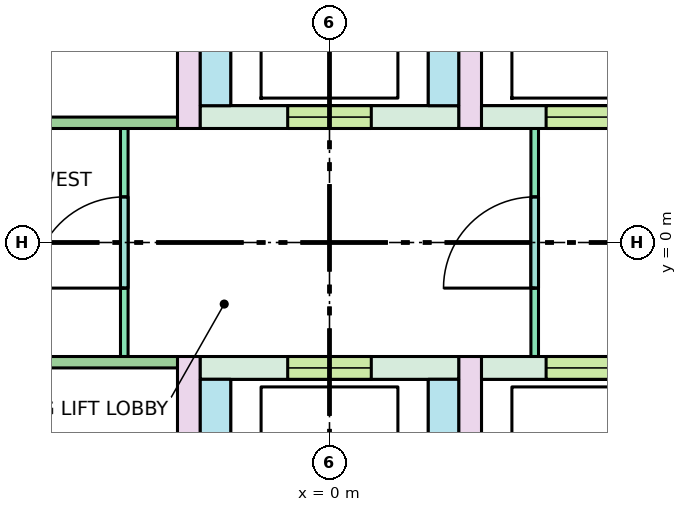
"""IFC4 building model, lengths in metres.
Left out: names, types, materials, properties, quantities, classifications, styles, units other than length and angle.
Written with IfcOpenShell. Run it as: python <this file> out.ifc"""

import sys

from ifc_helpers import new_model, si_unit, direction, frame, frame_2d, origin, place, context, subcontext, project, spatial, rectangle, extrude, element, fill, save


model = new_model("IFC4")
c1 = context("Model", 3, precision=1e-05, world=origin(), true_north=direction((0.0, 1.0)))
c2 = subcontext(c1, "Body", "Model", "MODEL_VIEW")
j1 = project(units=[si_unit("LENGTHUNIT", "METRE"), si_unit("PLANEANGLEUNIT", "RADIAN")], contexts=[c1])
p1 = place(None, origin())
s1 = spatial("IfcSite", under=j1, at=p1, CompositionType="ELEMENT")
p2 = place(p1, origin())
s2 = spatial("IfcBuilding", under=s1, at=p2, CompositionType="ELEMENT")
p3 = place(p2, frame((0.0, 0.0, 253.8)))
s3 = spatial("IfcBuildingStorey", under=s2, at=p3, CompositionType="ELEMENT", Elevation=253.8)
p4 = place(p3, frame((2.0, 1.65, 0.0), z_axis=(0.0, 0.0, 1.0), x_axis=(1.0, 0.0, 0.0)))
e1 = element("IfcWall", 1, at=p4, inside=s3, PredefinedType="SOLIDWALL", context=c2, shape_type="SweptSolid", body=[
    extrude(rectangle(XDim=8.1, YDim=0.3, at=frame_2d((4.05, 0.0))), origin(), (0.0, 0.0, 1.0), 3.42),
])
p5 = place(p4, frame((0.85, 0.0, 0.0)))
e2 = element("IfcOpeningElement", 2, at=p5, cuts=e1, PredefinedType="OPENING", context=c2, shape_type="SweptSolid", body=[
    extrude(rectangle(XDim=1.1, YDim=2.1, at=frame_2d((0.55, 1.05))), frame((0.0, 0.16, 0.0), z_axis=(0.0, -1.0, 0.0), x_axis=(1.0, 0.0, 0.0)), (0.0, 0.0, 1.0), 0.32),
])
p6 = place(p4, frame((3.5, 0.0, 0.0)))
e3 = element("IfcOpeningElement", 3, at=p6, cuts=e1, PredefinedType="OPENING", context=c2, shape_type="SweptSolid", body=[
    extrude(rectangle(XDim=1.1, YDim=2.1, at=frame_2d((0.55, 1.05))), frame((0.0, 0.16, 0.0), z_axis=(0.0, -1.0, 0.0), x_axis=(1.0, 0.0, 0.0)), (0.0, 0.0, 1.0), 0.32),
])
p7 = place(p4, frame((6.3, 0.0, 0.0)))
e4 = element("IfcOpeningElement", 4, at=p7, cuts=e1, PredefinedType="OPENING", context=c2, shape_type="SweptSolid", body=[
    extrude(rectangle(XDim=1.1, YDim=2.1, at=frame_2d((0.55, 1.05))), frame((0.0, 0.16, 0.0), z_axis=(0.0, -1.0, 0.0), x_axis=(1.0, 0.0, 0.0)), (0.0, 0.0, 1.0), 0.32),
])
p8 = place(p3, frame((2.0, -1.65, 0.0), z_axis=(0.0, 0.0, 1.0), x_axis=(1.0, 0.0, 0.0)))
e5 = element("IfcWall", 5, at=p8, inside=s3, PredefinedType="SOLIDWALL", context=c2, shape_type="SweptSolid", body=[
    extrude(rectangle(XDim=8.1, YDim=0.3, at=frame_2d((4.05, 0.0))), origin(), (0.0, 0.0, 1.0), 3.42),
])
p9 = place(p8, frame((0.85, 0.0, 0.0)))
e6 = element("IfcOpeningElement", 6, at=p9, cuts=e5, PredefinedType="OPENING", context=c2, shape_type="SweptSolid", body=[
    extrude(rectangle(XDim=1.1, YDim=2.1, at=frame_2d((0.55, 1.05))), frame((0.0, 0.16, 0.0), z_axis=(0.0, -1.0, 0.0), x_axis=(1.0, 0.0, 0.0)), (0.0, 0.0, 1.0), 0.32),
])
p10 = place(p8, frame((3.5, 0.0, 0.0)))
e7 = element("IfcOpeningElement", 7, at=p10, cuts=e5, PredefinedType="OPENING", context=c2, shape_type="SweptSolid", body=[
    extrude(rectangle(XDim=1.1, YDim=2.1, at=frame_2d((0.55, 1.05))), frame((0.0, 0.16, 0.0), z_axis=(0.0, -1.0, 0.0), x_axis=(1.0, 0.0, 0.0)), (0.0, 0.0, 1.0), 0.32),
])
p11 = place(p8, frame((6.3, 0.0, 0.0)))
e8 = element("IfcOpeningElement", 8, at=p11, cuts=e5, PredefinedType="OPENING", context=c2, shape_type="SweptSolid", body=[
    extrude(rectangle(XDim=1.1, YDim=2.1, at=frame_2d((0.55, 1.05))), frame((0.0, 0.16, 0.0), z_axis=(0.0, -1.0, 0.0), x_axis=(1.0, 0.0, 0.0)), (0.0, 0.0, 1.0), 0.32),
])
for number, where, z_axis, x_axis in (
    (9, (-1.85, 1.5, 0.0), (0.0, 0.0, 1.0), (0.0, 1.0, 0.0)),
    (10, (-1.85, -8.1, 0.0), (0.0, 0.0, 1.0), (0.0, 1.0, 0.0)),
    (11, (1.85, 1.5, 0.0), (0.0, 0.0, 1.0), (0.0, 1.0, 0.0)),
    (12, (1.85, -8.1, 0.0), (0.0, 0.0, 1.0), (0.0, 1.0, 0.0)),
):
    element("IfcWall", number, at=place(p3, frame(where, z_axis=z_axis, x_axis=x_axis)), inside=s3, PredefinedType="SHEAR", context=c2, shape_type="SweptSolid", body=[
        extrude(rectangle(XDim=6.6, YDim=0.3, at=frame_2d((3.3, 0.0))), origin(), (0.0, 0.0, 1.0), 3.42),
    ])
p12 = place(p3, frame((-1.7, 1.65, 0.0), z_axis=(0.0, 0.0, 1.0), x_axis=(1.0, 0.0, 0.0)))
e13 = element("IfcWall", 13, at=p12, inside=s3, PredefinedType="SOLIDWALL", context=c2, shape_type="SweptSolid", body=[
    extrude(rectangle(XDim=3.4, YDim=0.3, at=frame_2d((1.7, 0.0))), origin(), (0.0, 0.0, 1.0), 3.42),
])
p13 = place(p12, frame((1.15, 0.0, 0.0)))
e14 = element("IfcOpeningElement", 14, at=p13, cuts=e13, PredefinedType="OPENING", context=c2, shape_type="SweptSolid", body=[
    extrude(rectangle(XDim=1.1, YDim=2.1, at=frame_2d((0.55, 1.05))), frame((0.0, 0.16, 0.0), z_axis=(0.0, -1.0, 0.0), x_axis=(1.0, 0.0, 0.0)), (0.0, 0.0, 1.0), 0.32),
])
p14 = place(p3, frame((-1.7, -1.65, 0.0), z_axis=(0.0, 0.0, 1.0), x_axis=(1.0, 0.0, 0.0)))
e15 = element("IfcWall", 15, at=p14, inside=s3, PredefinedType="SOLIDWALL", context=c2, shape_type="SweptSolid", body=[
    extrude(rectangle(XDim=3.4, YDim=0.3, at=frame_2d((1.7, 0.0))), origin(), (0.0, 0.0, 1.0), 3.42),
])
p15 = place(p14, frame((1.15, 0.0, 0.0)))
e16 = element("IfcOpeningElement", 16, at=p15, cuts=e15, PredefinedType="OPENING", context=c2, shape_type="SweptSolid", body=[
    extrude(rectangle(XDim=1.1, YDim=2.1, at=frame_2d((0.55, 1.05))), frame((0.0, 0.16, 0.0), z_axis=(0.0, -1.0, 0.0), x_axis=(1.0, 0.0, 0.0)), (0.0, 0.0, 1.0), 0.32),
])
for number, where, z_axis, x_axis in (
    (17, (-1.5, 1.8, 0.0), (0.0, 0.0, 1.0), (0.0, 1.0, 0.0)),
    (18, (-1.5, -4.8, 0.0), (0.0, 0.0, 1.0), (0.0, 1.0, 0.0)),
    (19, (1.5, 1.8, 0.0), (0.0, 0.0, 1.0), (0.0, 1.0, 0.0)),
    (20, (1.5, -4.8, 0.0), (0.0, 0.0, 1.0), (0.0, 1.0, 0.0)),
):
    element("IfcWall", number, at=place(p3, frame(where, z_axis=z_axis, x_axis=x_axis)), inside=s3, PredefinedType="SOLIDWALL", context=c2, shape_type="SweptSolid", body=[
        extrude(rectangle(XDim=3.0, YDim=0.4, at=frame_2d((1.5, 0.0))), origin(), (0.0, 0.0, 1.0), 3.42),
    ])
p16 = place(p3, frame((-2.7, -1.5, 0.0), z_axis=(0.0, 0.0, 1.0), x_axis=(0.0, 1.0, 0.0)))
e21 = element("IfcWall", 21, at=p16, inside=s3, PredefinedType="PARTITIONING", context=c2, shape_type="SweptSolid", body=[
    extrude(rectangle(XDim=3.0, YDim=0.1, at=frame_2d((1.5, 0.0))), origin(), (0.0, 0.0, 1.0), 3.42),
])
p17 = place(p16, frame((0.9, 0.0, 0.0)))
e22 = element("IfcOpeningElement", 22, at=p17, cuts=e21, PredefinedType="OPENING", context=c2, shape_type="SweptSolid", body=[
    extrude(rectangle(XDim=1.2, YDim=2.1, at=frame_2d((0.6, 1.05))), frame((0.0, 0.06, 0.0), z_axis=(0.0, -1.0, 0.0), x_axis=(1.0, 0.0, 0.0)), (0.0, 0.0, 1.0), 0.12),
])
p18 = place(p3, frame((2.7, -1.5, 0.0), z_axis=(0.0, 0.0, 1.0), x_axis=(0.0, 1.0, 0.0)))
e23 = element("IfcWall", 23, at=p18, inside=s3, PredefinedType="PARTITIONING", context=c2, shape_type="SweptSolid", body=[
    extrude(rectangle(XDim=3.0, YDim=0.1, at=frame_2d((1.5, 0.0))), origin(), (0.0, 0.0, 1.0), 3.42),
])
p19 = place(p18, frame((0.9, 0.0, 0.0)))
e24 = element("IfcOpeningElement", 24, at=p19, cuts=e23, PredefinedType="OPENING", context=c2, shape_type="SweptSolid", body=[
    extrude(rectangle(XDim=1.2, YDim=2.1, at=frame_2d((0.6, 1.05))), frame((0.0, 0.06, 0.0), z_axis=(0.0, -1.0, 0.0), x_axis=(1.0, 0.0, 0.0)), (0.0, 0.0, 1.0), 0.12),
])
p20 = place(p3, frame((-10.1, 1.575, 0.0), z_axis=(0.0, 0.0, 1.0), x_axis=(1.0, 0.0, 0.0)))
e25 = element("IfcWall", 25, at=p20, inside=s3, PredefinedType="PARTITIONING", context=c2, shape_type="SweptSolid", body=[
    extrude(rectangle(XDim=8.1, YDim=0.15, at=frame_2d((4.05, 0.0))), origin(), (0.0, 0.0, 1.0), 3.42),
])
p21 = place(p20, frame((0.33, 0.0, 0.0)))
e26 = element("IfcOpeningElement", 26, at=p21, cuts=e25, PredefinedType="OPENING", context=c2, shape_type="SweptSolid", body=[
    extrude(rectangle(XDim=0.9, YDim=2.1, at=frame_2d((0.45, 1.05))), frame((0.0, 0.085, 0.0), z_axis=(0.0, -1.0, 0.0), x_axis=(1.0, 0.0, 0.0)), (0.0, 0.0, 1.0), 0.17),
])
p22 = place(p20, frame((2.04, 0.0, 0.0)))
e27 = element("IfcOpeningElement", 27, at=p22, cuts=e25, PredefinedType="OPENING", context=c2, shape_type="SweptSolid", body=[
    extrude(rectangle(XDim=0.9, YDim=2.1, at=frame_2d((0.45, 1.05))), frame((0.0, 0.085, 0.0), z_axis=(0.0, -1.0, 0.0), x_axis=(1.0, 0.0, 0.0)), (0.0, 0.0, 1.0), 0.17),
])
p23 = place(p20, frame((5.31, 0.0, 0.0)))
e28 = element("IfcOpeningElement", 28, at=p23, cuts=e25, PredefinedType="OPENING", context=c2, shape_type="SweptSolid", body=[
    extrude(rectangle(XDim=0.9, YDim=2.1, at=frame_2d((0.45, 1.05))), frame((0.0, 0.085, 0.0), z_axis=(0.0, -1.0, 0.0), x_axis=(1.0, 0.0, 0.0)), (0.0, 0.0, 1.0), 0.17),
])
p24 = place(p3, frame((-10.1, -1.575, 0.0), z_axis=(0.0, 0.0, 1.0), x_axis=(1.0, 0.0, 0.0)))
e29 = element("IfcWall", 29, at=p24, inside=s3, PredefinedType="PARTITIONING", context=c2, shape_type="SweptSolid", body=[
    extrude(rectangle(XDim=8.1, YDim=0.15, at=frame_2d((4.05, 0.0))), origin(), (0.0, 0.0, 1.0), 3.42),
])
p25 = place(p24, frame((0.941, 0.0, 0.0)))
e30 = element("IfcOpeningElement", 30, at=p25, cuts=e29, PredefinedType="OPENING", context=c2, shape_type="SweptSolid", body=[
    extrude(rectangle(XDim=0.9, YDim=2.1, at=frame_2d((0.45, 1.05))), frame((0.0, 0.085, 0.0), z_axis=(0.0, -1.0, 0.0), x_axis=(1.0, 0.0, 0.0)), (0.0, 0.0, 1.0), 0.17),
])
p26 = place(p24, frame((5.066, 0.0, 0.0)))
e31 = element("IfcOpeningElement", 31, at=p26, cuts=e29, PredefinedType="OPENING", context=c2, shape_type="SweptSolid", body=[
    extrude(rectangle(XDim=0.9, YDim=2.1, at=frame_2d((0.45, 1.05))), frame((0.0, 0.085, 0.0), z_axis=(0.0, -1.0, 0.0), x_axis=(1.0, 0.0, 0.0)), (0.0, 0.0, 1.0), 0.17),
])
p27 = place(p5, origin())
e32 = element("IfcDoor", 32, at=p27, inside=s3, OperationType="DOUBLE_DOOR_SLIDING", PredefinedType="DOOR", context=c2, shape_type="SweptSolid", body=[
    extrude(rectangle(XDim=1.1, YDim=2.1, at=frame_2d((0.55, 1.05))), frame((0.0, 0.025, 0.0), z_axis=(0.0, -1.0, 0.0), x_axis=(1.0, 0.0, 0.0)), (0.0, 0.0, 1.0), 0.05),
])
fill(e2, e32)
p28 = place(p9, origin())
e33 = element("IfcDoor", 33, at=p28, inside=s3, OperationType="DOUBLE_DOOR_SLIDING", PredefinedType="DOOR", context=c2, shape_type="SweptSolid", body=[
    extrude(rectangle(XDim=1.1, YDim=2.1, at=frame_2d((0.55, 1.05))), frame((0.0, 0.025, 0.0), z_axis=(0.0, -1.0, 0.0), x_axis=(1.0, 0.0, 0.0)), (0.0, 0.0, 1.0), 0.05),
])
fill(e6, e33)
p29 = place(p13, origin())
e34 = element("IfcDoor", 34, at=p29, inside=s3, OperationType="DOUBLE_DOOR_SLIDING", PredefinedType="DOOR", context=c2, shape_type="SweptSolid", body=[
    extrude(rectangle(XDim=1.1, YDim=2.1, at=frame_2d((0.55, 1.05))), frame((0.0, 0.025, 0.0), z_axis=(0.0, -1.0, 0.0), x_axis=(1.0, 0.0, 0.0)), (0.0, 0.0, 1.0), 0.05),
])
fill(e14, e34)
p30 = place(p15, origin())
e35 = element("IfcDoor", 35, at=p30, inside=s3, OperationType="DOUBLE_DOOR_SLIDING", PredefinedType="DOOR", context=c2, shape_type="SweptSolid", body=[
    extrude(rectangle(XDim=1.1, YDim=2.1, at=frame_2d((0.55, 1.05))), frame((0.0, 0.025, 0.0), z_axis=(0.0, -1.0, 0.0), x_axis=(1.0, 0.0, 0.0)), (0.0, 0.0, 1.0), 0.05),
])
fill(e16, e35)
p31 = place(p17, origin())
e36 = element("IfcDoor", 36, at=p31, inside=s3, OperationType="SINGLE_SWING_LEFT", PredefinedType="DOOR", context=c2, shape_type="SweptSolid", body=[
    extrude(rectangle(XDim=1.2, YDim=2.1, at=frame_2d((0.6, 1.05))), frame((0.0, 0.025, 0.0), z_axis=(0.0, -1.0, 0.0), x_axis=(1.0, 0.0, 0.0)), (0.0, 0.0, 1.0), 0.05),
])
fill(e22, e36)
p32 = place(p19, origin())
e37 = element("IfcDoor", 37, at=p32, inside=s3, OperationType="SINGLE_SWING_LEFT", PredefinedType="DOOR", context=c2, shape_type="SweptSolid", body=[
    extrude(rectangle(XDim=1.2, YDim=2.1, at=frame_2d((0.6, 1.05))), frame((0.0, 0.025, 0.0), z_axis=(0.0, -1.0, 0.0), x_axis=(1.0, 0.0, 0.0)), (0.0, 0.0, 1.0), 0.05),
])
fill(e24, e37)
save(model, sys.argv[1])
